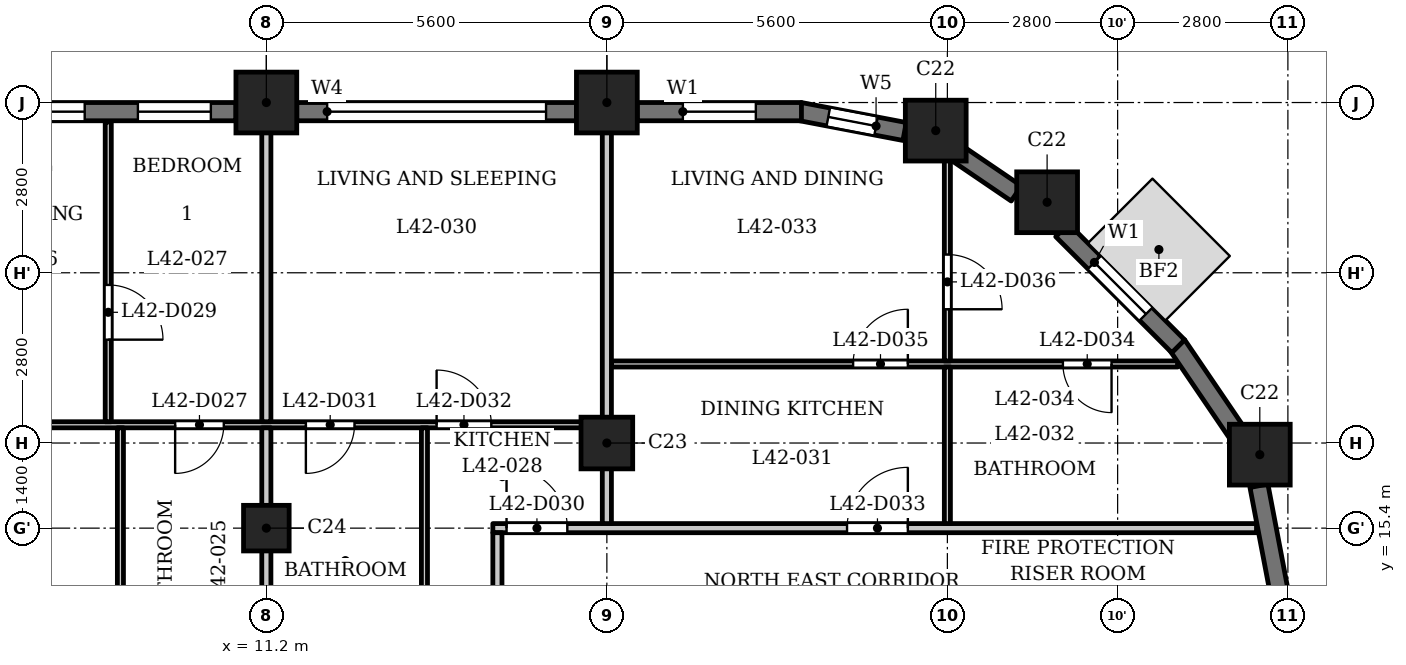
"""IFC4 building model, lengths in metres.
Left out: names, types, materials, properties, quantities, classifications, styles, units other than length and angle.
Written with IfcOpenShell. Run it as: python <this file> out.ifc"""

import sys

from ifc_helpers import new_model, si_unit, direction, frame, frame_2d, origin, origin_2d, place, context, subcontext, project, spatial, rectangle, extrude, element, fill, save


model = new_model("IFC4")
c1 = context("Model", 3, precision=1e-05, world=origin(), true_north=direction((0.0, 1.0)))
c2 = subcontext(c1, "Body", "Model", "MODEL_VIEW")
j1 = project(units=[si_unit("LENGTHUNIT", "METRE"), si_unit("PLANEANGLEUNIT", "RADIAN")], contexts=[c1])
p1 = place(None, origin())
s1 = spatial("IfcSite", under=j1, at=p1, CompositionType="ELEMENT")
p2 = place(p1, origin())
s2 = spatial("IfcBuilding", under=s1, at=p2, CompositionType="ELEMENT")
p3 = place(p2, frame((0.0, 0.0, 164.1)))
s3 = spatial("IfcBuildingStorey", under=s2, at=p3, CompositionType="ELEMENT", Elevation=164.1)
for number, where, z_axis, x_axis in (
    (1, (27.538, 16.609, 0.0), (0.0, 0.0, 1.0), (1.0, 0.0, 0.0)),
    (2, (24.04, 20.76, 0.0), (0.0, 0.0, 1.0), (1.0, 0.0, 0.0)),
    (3, (22.209, 21.938, 0.0), (0.0, 0.0, 1.0), (1.0, 0.0, 0.0)),
    (4, (16.8, 22.4, 0.0), (0.0, 0.0, 1.0), (1.0, 0.0, 0.0)),
    (5, (11.2, 22.4, 0.0), (0.0, 0.0, 1.0), (1.0, 0.0, 0.0)),
):
    element("IfcColumn", number, at=place(p3, frame(where, z_axis=z_axis, x_axis=x_axis)), inside=s3, PredefinedType="COLUMN", context=c2, shape_type="SweptSolid", body=[
        extrude(rectangle(XDim=1.0, YDim=1.0, at=origin_2d()), origin(), (0.0, 0.0, 1.0), 3.5),
    ])
p4 = place(p3, frame((16.8, 16.8, 0.0), z_axis=(0.0, 0.0, 1.0), x_axis=(1.0, 0.0, 0.0)))
e6 = element("IfcColumn", 6, at=p4, inside=s3, PredefinedType="COLUMN", context=c2, shape_type="SweptSolid", body=[
    extrude(rectangle(XDim=0.85, YDim=0.85, at=origin_2d()), origin(), (0.0, 0.0, 1.0), 3.5),
])
p5 = place(p3, frame((11.2, 15.4, 0.0), z_axis=(0.0, 0.0, 1.0), x_axis=(1.0, 0.0, 0.0)))
e7 = element("IfcColumn", 7, at=p5, inside=s3, PredefinedType="COLUMN", context=c2, shape_type="SweptSolid", body=[
    extrude(rectangle(XDim=0.75, YDim=0.75, at=origin_2d()), origin(), (0.0, 0.0, 1.0), 3.5),
])
for number, where, z_axis, x_axis in (
    (8, (27.853, 14.372, 0.0), (0.0, 0.0, 1.0), (-0.187, 0.982, 0.0)),
    (9, (27.166, 16.96, 0.0), (0.0, 0.0, 1.0), (-0.562, 0.827, 0.0)),
):
    element("IfcWall", number, at=place(p3, frame(where, z_axis=z_axis, x_axis=x_axis)), inside=s3, PredefinedType="SOLIDWALL", context=c2, shape_type="SweptSolid", body=[
        extrude(rectangle(XDim=1.756, YDim=0.3, at=frame_2d((0.878, 0.0))), origin(), (0.0, 0.0, 1.0), 2.45),
    ])
p6 = place(p3, frame((26.197, 18.391, 0.0), z_axis=(0.0, 0.0, 1.0), x_axis=(-0.707061571201, 0.707151988282, 0.0)))
e10 = element("IfcWall", 10, at=p6, inside=s3, PredefinedType="SOLIDWALL", context=c2, shape_type="SweptSolid", body=[
    extrude(rectangle(XDim=2.7, YDim=0.3, at=frame_2d((1.35, 0.0))), origin(), (0.0, 0.0, 1.0), 2.45),
])
p7 = place(p6, frame((0.75, 0.0, 0.6)))
e11 = element("IfcOpeningElement", 11, at=p7, cuts=e10, PredefinedType="OPENING", context=c2, shape_type="SweptSolid", body=[
    extrude(rectangle(XDim=1.2, YDim=1.55, at=frame_2d((0.6, 0.775))), frame((0.0, 0.16, 0.0), z_axis=(0.0, -1.0, 0.0), x_axis=(1.0, 0.0, 0.0)), (0.0, 0.0, 1.0), 0.32),
])
p8 = place(p3, frame((23.534, 20.904, 0.0), z_axis=(0.0, 0.0, 1.0), x_axis=(-0.827103906596, 0.56204904385, 0.0)))
e12 = element("IfcWall", 12, at=p8, inside=s3, PredefinedType="SOLIDWALL", context=c2, shape_type="SweptSolid", body=[
    extrude(rectangle(XDim=1.177, YDim=0.3, at=frame_2d((0.589, 0.0))), origin(), (0.0, 0.0, 1.0), 3.2),
])
p9 = place(p3, frame((21.697, 21.924, 0.0), z_axis=(0.0, 0.0, 1.0), x_axis=(-0.982284988433, 0.187393173565, 0.0)))
e13 = element("IfcWall", 13, at=p9, inside=s3, PredefinedType="SOLIDWALL", context=c2, shape_type="SweptSolid", body=[
    extrude(rectangle(XDim=1.756, YDim=0.3, at=frame_2d((0.878, 0.0))), origin(), (0.0, 0.0, 1.0), 2.45),
])
p10 = place(p9, frame((0.478, 0.0, 0.6)))
e14 = element("IfcOpeningElement", 14, at=p10, cuts=e13, PredefinedType="OPENING", context=c2, shape_type="SweptSolid", body=[
    extrude(rectangle(XDim=0.8, YDim=1.55, at=frame_2d((0.4, 0.775))), frame((0.0, 0.16, 0.0), z_axis=(0.0, -1.0, 0.0), x_axis=(1.0, 0.0, 0.0)), (0.0, 0.0, 1.0), 0.32),
])
p11 = place(p3, frame((20.0, 22.25, 0.0), z_axis=(0.0, 0.0, 1.0), x_axis=(-1.0, 0.0, 0.0)))
e15 = element("IfcWall", 15, at=p11, inside=s3, PredefinedType="SOLIDWALL", context=c2, shape_type="SweptSolid", body=[
    extrude(rectangle(XDim=2.7, YDim=0.3, at=frame_2d((1.35, 0.0))), origin(), (0.0, 0.0, 1.0), 2.45),
])
p12 = place(p11, frame((0.75, 0.0, 0.6)))
e16 = element("IfcOpeningElement", 16, at=p12, cuts=e15, PredefinedType="OPENING", context=c2, shape_type="SweptSolid", body=[
    extrude(rectangle(XDim=1.2, YDim=1.55, at=frame_2d((0.6, 0.775))), frame((0.0, 0.16, 0.0), z_axis=(0.0, -1.0, 0.0), x_axis=(1.0, 0.0, 0.0)), (0.0, 0.0, 1.0), 0.32),
])
p13 = place(p3, frame((16.3, 22.25, 0.0), z_axis=(0.0, 0.0, 1.0), x_axis=(-1.0, 0.0, 0.0)))
e17 = element("IfcWall", 17, at=p13, inside=s3, PredefinedType="SOLIDWALL", context=c2, shape_type="SweptSolid", body=[
    extrude(rectangle(XDim=4.6, YDim=0.3, at=frame_2d((2.3, 0.0))), origin(), (0.0, 0.0, 1.0), 2.45),
])
p14 = place(p13, frame((0.5, 0.0, 1.2)))
e18 = element("IfcOpeningElement", 18, at=p14, cuts=e17, PredefinedType="OPENING", context=c2, shape_type="SweptSolid", body=[
    extrude(rectangle(XDim=3.6, YDim=0.95, at=frame_2d((1.8, 0.475))), frame((0.0, 0.16, 0.0), z_axis=(0.0, -1.0, 0.0), x_axis=(1.0, 0.0, 0.0)), (0.0, 0.0, 1.0), 0.32),
])
p15 = place(p3, frame((10.7, 22.25, 0.0), z_axis=(0.0, 0.0, 1.0), x_axis=(-1.0, 0.0, 0.0)))
e19 = element("IfcWall", 19, at=p15, inside=s3, PredefinedType="SOLIDWALL", context=c2, shape_type="SweptSolid", body=[
    extrude(rectangle(XDim=4.6, YDim=0.3, at=frame_2d((2.3, 0.0))), origin(), (0.0, 0.0, 1.0), 2.45),
])
p16 = place(p15, frame((0.413, 0.0, 0.6)))
e20 = element("IfcOpeningElement", 20, at=p16, cuts=e19, PredefinedType="OPENING", context=c2, shape_type="SweptSolid", body=[
    extrude(rectangle(XDim=1.2, YDim=1.55, at=frame_2d((0.6, 0.775))), frame((0.0, 0.16, 0.0), z_axis=(0.0, -1.0, 0.0), x_axis=(1.0, 0.0, 0.0)), (0.0, 0.0, 1.0), 0.32),
])
p17 = place(p15, frame((2.488, 0.0, 0.9)))
e21 = element("IfcOpeningElement", 21, at=p17, cuts=e19, PredefinedType="OPENING", context=c2, shape_type="SweptSolid", body=[
    extrude(rectangle(XDim=1.8, YDim=1.25, at=frame_2d((0.9, 0.625))), frame((0.0, 0.16, 0.0), z_axis=(0.0, -1.0, 0.0), x_axis=(1.0, 0.0, 0.0)), (0.0, 0.0, 1.0), 0.32),
])
p18 = place(p3, frame((14.925, 15.4, 0.0), z_axis=(0.0, 0.0, 1.0), x_axis=(1.0, 0.0, 0.0)))
e22 = element("IfcWall", 22, at=p18, inside=s3, PredefinedType="PARTITIONING", context=c2, shape_type="SweptSolid", body=[
    extrude(rectangle(XDim=12.559, YDim=0.15, at=frame_2d((6.279, 0.0))), origin(), (0.0, 0.0, 1.0), 3.2),
])
p19 = place(p18, frame((0.225, 0.0, 0.0)))
e23 = element("IfcOpeningElement", 23, at=p19, cuts=e22, PredefinedType="OPENING", context=c2, shape_type="SweptSolid", body=[
    extrude(rectangle(XDim=1.0, YDim=2.1, at=frame_2d((0.5, 1.05))), frame((0.0, 0.085, 0.0), z_axis=(0.0, -1.0, 0.0), x_axis=(1.0, 0.0, 0.0)), (0.0, 0.0, 1.0), 0.17),
])
p20 = place(p18, frame((5.825, 0.0, 0.0)))
e24 = element("IfcOpeningElement", 24, at=p20, cuts=e22, PredefinedType="OPENING", context=c2, shape_type="SweptSolid", body=[
    extrude(rectangle(XDim=1.0, YDim=2.1, at=frame_2d((0.5, 1.05))), frame((0.0, 0.085, 0.0), z_axis=(0.0, -1.0, 0.0), x_axis=(1.0, 0.0, 0.0)), (0.0, 0.0, 1.0), 0.17),
])
p21 = place(p3, frame((-16.725, 17.1, 0.0), z_axis=(0.0, 0.0, 1.0), x_axis=(1.0, 0.0, 0.0)))
e25 = element("IfcWall", 25, at=p21, inside=s3, PredefinedType="PARTITIONING", context=c2, shape_type="SweptSolid", body=[
    extrude(rectangle(XDim=33.45, YDim=0.1, at=frame_2d((16.725, 0.0))), origin(), (0.0, 0.0, 1.0), 3.2),
])
p22 = place(p21, frame((11.925, 0.0, 0.0)))
e26 = element("IfcOpeningElement", 26, at=p22, cuts=e25, PredefinedType="OPENING", context=c2, shape_type="SweptSolid", body=[
    extrude(rectangle(XDim=0.9, YDim=2.1, at=frame_2d((0.45, 1.05))), frame((0.0, 0.06, 0.0), z_axis=(0.0, -1.0, 0.0), x_axis=(1.0, 0.0, 0.0)), (0.0, 0.0, 1.0), 0.12),
])
p23 = place(p21, frame((15.175, 0.0, 0.0)))
e27 = element("IfcOpeningElement", 27, at=p23, cuts=e25, PredefinedType="OPENING", context=c2, shape_type="SweptSolid", body=[
    extrude(rectangle(XDim=0.9, YDim=2.1, at=frame_2d((0.45, 1.05))), frame((0.0, 0.06, 0.0), z_axis=(0.0, -1.0, 0.0), x_axis=(1.0, 0.0, 0.0)), (0.0, 0.0, 1.0), 0.12),
])
p24 = place(p21, frame((6.575, 0.0, 0.0)))
e28 = element("IfcOpeningElement", 28, at=p24, cuts=e25, PredefinedType="OPENING", context=c2, shape_type="SweptSolid", body=[
    extrude(rectangle(XDim=0.9, YDim=2.1, at=frame_2d((0.45, 1.05))), frame((0.0, 0.06, 0.0), z_axis=(0.0, -1.0, 0.0), x_axis=(1.0, 0.0, 0.0)), (0.0, 0.0, 1.0), 0.12),
])
p25 = place(p21, frame((17.375, 0.0, 0.0)))
e29 = element("IfcOpeningElement", 29, at=p25, cuts=e25, PredefinedType="OPENING", context=c2, shape_type="SweptSolid", body=[
    extrude(rectangle(XDim=0.8, YDim=2.1, at=frame_2d((0.4, 1.05))), frame((0.0, 0.06, 0.0), z_axis=(0.0, -1.0, 0.0), x_axis=(1.0, 0.0, 0.0)), (0.0, 0.0, 1.0), 0.12),
])
p26 = place(p21, frame((20.025, 0.0, 0.0)))
e30 = element("IfcOpeningElement", 30, at=p26, cuts=e25, PredefinedType="OPENING", context=c2, shape_type="SweptSolid", body=[
    extrude(rectangle(XDim=0.9, YDim=2.1, at=frame_2d((0.45, 1.05))), frame((0.0, 0.06, 0.0), z_axis=(0.0, -1.0, 0.0), x_axis=(1.0, 0.0, 0.0)), (0.0, 0.0, 1.0), 0.12),
])
p27 = place(p21, frame((26.425, 0.0, 0.0)))
e31 = element("IfcOpeningElement", 31, at=p27, cuts=e25, PredefinedType="OPENING", context=c2, shape_type="SweptSolid", body=[
    extrude(rectangle(XDim=0.8, YDim=2.1, at=frame_2d((0.4, 1.05))), frame((0.0, 0.06, 0.0), z_axis=(0.0, -1.0, 0.0), x_axis=(1.0, 0.0, 0.0)), (0.0, 0.0, 1.0), 0.12),
])
p28 = place(p21, frame((23.025, 0.0, 0.0)))
e32 = element("IfcOpeningElement", 32, at=p28, cuts=e25, PredefinedType="OPENING", context=c2, shape_type="SweptSolid", body=[
    extrude(rectangle(XDim=0.9, YDim=2.1, at=frame_2d((0.45, 1.05))), frame((0.0, 0.06, 0.0), z_axis=(0.0, -1.0, 0.0), x_axis=(1.0, 0.0, 0.0)), (0.0, 0.0, 1.0), 0.12),
])
p29 = place(p21, frame((28.575, 0.0, 0.0)))
e33 = element("IfcOpeningElement", 33, at=p29, cuts=e25, PredefinedType="OPENING", context=c2, shape_type="SweptSolid", body=[
    extrude(rectangle(XDim=0.8, YDim=2.1, at=frame_2d((0.4, 1.05))), frame((0.0, 0.06, 0.0), z_axis=(0.0, -1.0, 0.0), x_axis=(1.0, 0.0, 0.0)), (0.0, 0.0, 1.0), 0.12),
])
p30 = place(p21, frame((30.725, 0.0, 0.0)))
e34 = element("IfcOpeningElement", 34, at=p30, cuts=e25, PredefinedType="OPENING", context=c2, shape_type="SweptSolid", body=[
    extrude(rectangle(XDim=0.9, YDim=2.1, at=frame_2d((0.45, 1.05))), frame((0.0, 0.06, 0.0), z_axis=(0.0, -1.0, 0.0), x_axis=(1.0, 0.0, 0.0)), (0.0, 0.0, 1.0), 0.12),
])
p31 = place(p3, frame((16.875, 18.1, 0.0), z_axis=(0.0, 0.0, 1.0), x_axis=(1.0, 0.0, 0.0)))
e35 = element("IfcWall", 35, at=p31, inside=s3, PredefinedType="PARTITIONING", context=c2, shape_type="SweptSolid", body=[
    extrude(rectangle(XDim=9.315, YDim=0.1, at=frame_2d((4.658, 0.0))), origin(), (0.0, 0.0, 1.0), 3.2),
])
p32 = place(p31, frame((7.425, 0.0, 0.0)))
e36 = element("IfcOpeningElement", 36, at=p32, cuts=e35, PredefinedType="OPENING", context=c2, shape_type="SweptSolid", body=[
    extrude(rectangle(XDim=0.8, YDim=2.1, at=frame_2d((0.4, 1.05))), frame((0.0, 0.06, 0.0), z_axis=(0.0, -1.0, 0.0), x_axis=(1.0, 0.0, 0.0)), (0.0, 0.0, 1.0), 0.12),
])
p33 = place(p31, frame((3.975, 0.0, 0.0)))
e37 = element("IfcOpeningElement", 37, at=p33, cuts=e35, PredefinedType="OPENING", context=c2, shape_type="SweptSolid", body=[
    extrude(rectangle(XDim=0.9, YDim=2.1, at=frame_2d((0.45, 1.05))), frame((0.0, 0.06, 0.0), z_axis=(0.0, -1.0, 0.0), x_axis=(1.0, 0.0, 0.0)), (0.0, 0.0, 1.0), 0.12),
])
p34 = place(p3, frame((8.6, 17.15, 0.0), z_axis=(0.0, 0.0, 1.0), x_axis=(0.0, 1.0, 0.0)))
e38 = element("IfcWall", 38, at=p34, inside=s3, PredefinedType="PARTITIONING", context=c2, shape_type="SweptSolid", body=[
    extrude(rectangle(XDim=4.93, YDim=0.1, at=frame_2d((2.465, 0.0))), origin(), (0.0, 0.0, 1.0), 3.2),
])
p35 = place(p34, frame((1.35, 0.0, 0.0)))
e39 = element("IfcOpeningElement", 39, at=p35, cuts=e38, PredefinedType="OPENING", context=c2, shape_type="SweptSolid", body=[
    extrude(rectangle(XDim=0.9, YDim=2.1, at=frame_2d((0.45, 1.05))), frame((0.0, 0.06, 0.0), z_axis=(0.0, -1.0, 0.0), x_axis=(1.0, 0.0, 0.0)), (0.0, 0.0, 1.0), 0.12),
])
p36 = place(p3, frame((8.8, 13.275, 0.0), z_axis=(0.0, 0.0, 1.0), x_axis=(0.0, 1.0, 0.0)))
e40 = element("IfcWall", 40, at=p36, inside=s3, PredefinedType="PARTITIONING", context=c2, shape_type="SweptSolid", body=[
    extrude(rectangle(XDim=3.775, YDim=0.1, at=frame_2d((1.888, 0.0))), origin(), (0.0, 0.0, 1.0), 3.2),
])
p37 = place(p3, frame((11.2, 13.275, 0.0), z_axis=(0.0, 0.0, 1.0), x_axis=(0.0, 1.0, 0.0)))
e41 = element("IfcWall", 41, at=p37, inside=s3, PredefinedType="PARTITIONING", context=c2, shape_type="SweptSolid", body=[
    extrude(rectangle(XDim=3.775, YDim=0.15, at=frame_2d((1.888, 0.0))), origin(), (0.0, 0.0, 1.0), 3.2),
])
p38 = place(p3, frame((11.2, 17.15, 0.0), z_axis=(0.0, 0.0, 1.0), x_axis=(0.0, 1.0, 0.0)))
e42 = element("IfcWall", 42, at=p38, inside=s3, PredefinedType="PARTITIONING", context=c2, shape_type="SweptSolid", body=[
    extrude(rectangle(XDim=5.73, YDim=0.15, at=frame_2d((2.865, 0.0))), origin(), (0.0, 0.0, 1.0), 3.2),
])
p39 = place(p3, frame((13.8, 13.275, 0.0), z_axis=(0.0, 0.0, 1.0), x_axis=(0.0, 1.0, 0.0)))
e43 = element("IfcWall", 43, at=p39, inside=s3, PredefinedType="PARTITIONING", context=c2, shape_type="SweptSolid", body=[
    extrude(rectangle(XDim=3.775, YDim=0.1, at=frame_2d((1.888, 0.0))), origin(), (0.0, 0.0, 1.0), 3.2),
])
p40 = place(p3, frame((15.0, 13.275, 0.0), z_axis=(0.0, 0.0, 1.0), x_axis=(0.0, 1.0, 0.0)))
e44 = element("IfcWall", 44, at=p40, inside=s3, PredefinedType="PARTITIONING", context=c2, shape_type="SweptSolid", body=[
    extrude(rectangle(XDim=2.05, YDim=0.15, at=frame_2d((1.025, 0.0))), origin(), (0.0, 0.0, 1.0), 3.2),
])
p41 = place(p3, frame((16.8, 15.475, 0.0), z_axis=(0.0, 0.0, 1.0), x_axis=(0.0, 1.0, 0.0)))
e45 = element("IfcWall", 45, at=p41, inside=s3, PredefinedType="PARTITIONING", context=c2, shape_type="SweptSolid", body=[
    extrude(rectangle(XDim=7.405, YDim=0.15, at=frame_2d((3.702, 0.0))), origin(), (0.0, 0.0, 1.0), 3.2),
])
p42 = place(p3, frame((22.4, 15.475, 0.0), z_axis=(0.0, 0.0, 1.0), x_axis=(0.0, 1.0, 0.0)))
e46 = element("IfcWall", 46, at=p42, inside=s3, PredefinedType="PARTITIONING", context=c2, shape_type="SweptSolid", body=[
    extrude(rectangle(XDim=2.575, YDim=0.1, at=frame_2d((1.288, 0.0))), origin(), (0.0, 0.0, 1.0), 3.2),
])
p43 = place(p3, frame((22.4, 18.15, 0.0), z_axis=(0.0, 0.0, 1.0), x_axis=(0.0, 1.0, 0.0)))
e47 = element("IfcWall", 47, at=p43, inside=s3, PredefinedType="PARTITIONING", context=c2, shape_type="SweptSolid", body=[
    extrude(rectangle(XDim=3.57, YDim=0.1, at=frame_2d((1.785, 0.0))), origin(), (0.0, 0.0, 1.0), 3.2),
])
p44 = place(p43, frame((0.85, 0.0, 0.0)))
e48 = element("IfcOpeningElement", 48, at=p44, cuts=e47, PredefinedType="OPENING", context=c2, shape_type="SweptSolid", body=[
    extrude(rectangle(XDim=0.9, YDim=2.1, at=frame_2d((0.45, 1.05))), frame((0.0, 0.06, 0.0), z_axis=(0.0, -1.0, 0.0), x_axis=(1.0, 0.0, 0.0)), (0.0, 0.0, 1.0), 0.12),
])
p45 = place(p27, origin())
e49 = element("IfcDoor", 49, at=p45, inside=s3, OperationType="SINGLE_SWING_LEFT", PredefinedType="DOOR", context=c2, shape_type="SweptSolid", body=[
    extrude(rectangle(XDim=0.8, YDim=2.1, at=frame_2d((0.4, 1.05))), frame((0.0, 0.025, 0.0), z_axis=(0.0, -1.0, 0.0), x_axis=(1.0, 0.0, 0.0)), (0.0, 0.0, 1.0), 0.05),
])
fill(e31, e49)
p46 = place(p35, origin())
e50 = element("IfcDoor", 50, at=p46, inside=s3, OperationType="SINGLE_SWING_LEFT", PredefinedType="DOOR", context=c2, shape_type="SweptSolid", body=[
    extrude(rectangle(XDim=0.9, YDim=2.1, at=frame_2d((0.45, 1.05))), frame((0.0, 0.025, 0.0), z_axis=(0.0, -1.0, 0.0), x_axis=(1.0, 0.0, 0.0)), (0.0, 0.0, 1.0), 0.05),
])
fill(e39, e50)
p47 = place(p19, origin())
e51 = element("IfcDoor", 51, at=p47, inside=s3, OperationType="SINGLE_SWING_RIGHT", PredefinedType="DOOR", context=c2, shape_type="SweptSolid", body=[
    extrude(rectangle(XDim=1.0, YDim=2.1, at=frame_2d((0.5, 1.05))), frame((0.0, 0.025, 0.0), z_axis=(0.0, -1.0, 0.0), x_axis=(1.0, 0.0, 0.0)), (0.0, 0.0, 1.0), 0.05),
])
fill(e23, e51)
p48 = place(p29, origin())
e52 = element("IfcDoor", 52, at=p48, inside=s3, OperationType="SINGLE_SWING_LEFT", PredefinedType="DOOR", context=c2, shape_type="SweptSolid", body=[
    extrude(rectangle(XDim=0.8, YDim=2.1, at=frame_2d((0.4, 1.05))), frame((0.0, 0.025, 0.0), z_axis=(0.0, -1.0, 0.0), x_axis=(1.0, 0.0, 0.0)), (0.0, 0.0, 1.0), 0.05),
])
fill(e33, e52)
p49 = place(p30, origin())
e53 = element("IfcDoor", 53, at=p49, inside=s3, OperationType="SINGLE_SWING_RIGHT", PredefinedType="DOOR", context=c2, shape_type="SweptSolid", body=[
    extrude(rectangle(XDim=0.9, YDim=2.1, at=frame_2d((0.45, 1.05))), frame((0.0, 0.025, 0.0), z_axis=(0.0, -1.0, 0.0), x_axis=(1.0, 0.0, 0.0)), (0.0, 0.0, 1.0), 0.05),
])
fill(e34, e53)
p50 = place(p20, origin())
e54 = element("IfcDoor", 54, at=p50, inside=s3, OperationType="SINGLE_SWING_LEFT", PredefinedType="DOOR", context=c2, shape_type="SweptSolid", body=[
    extrude(rectangle(XDim=1.0, YDim=2.1, at=frame_2d((0.5, 1.05))), frame((0.0, 0.025, 0.0), z_axis=(0.0, -1.0, 0.0), x_axis=(1.0, 0.0, 0.0)), (0.0, 0.0, 1.0), 0.05),
])
fill(e24, e54)
p51 = place(p32, origin())
e55 = element("IfcDoor", 55, at=p51, inside=s3, OperationType="SINGLE_SWING_RIGHT", PredefinedType="DOOR", context=c2, shape_type="SweptSolid", body=[
    extrude(rectangle(XDim=0.8, YDim=2.1, at=frame_2d((0.4, 1.05))), frame((0.0, 0.025, 0.0), z_axis=(0.0, -1.0, 0.0), x_axis=(1.0, 0.0, 0.0)), (0.0, 0.0, 1.0), 0.05),
])
fill(e36, e55)
p52 = place(p33, origin())
e56 = element("IfcDoor", 56, at=p52, inside=s3, OperationType="SINGLE_SWING_LEFT", PredefinedType="DOOR", context=c2, shape_type="SweptSolid", body=[
    extrude(rectangle(XDim=0.9, YDim=2.1, at=frame_2d((0.45, 1.05))), frame((0.0, 0.025, 0.0), z_axis=(0.0, -1.0, 0.0), x_axis=(1.0, 0.0, 0.0)), (0.0, 0.0, 1.0), 0.05),
])
fill(e37, e56)
p53 = place(p44, origin())
e57 = element("IfcDoor", 57, at=p53, inside=s3, OperationType="SINGLE_SWING_LEFT", PredefinedType="DOOR", context=c2, shape_type="SweptSolid", body=[
    extrude(rectangle(XDim=0.9, YDim=2.1, at=frame_2d((0.45, 1.05))), frame((0.0, 0.025, 0.0), z_axis=(0.0, -1.0, 0.0), x_axis=(1.0, 0.0, 0.0)), (0.0, 0.0, 1.0), 0.05),
])
fill(e48, e57)
p54 = place(p7, origin())
e58 = element("IfcWindow", 58, at=p54, inside=s3, PartitioningType="SINGLE_PANEL", PredefinedType="WINDOW", context=c2, shape_type="SweptSolid", body=[
    extrude(rectangle(XDim=1.2, YDim=1.55, at=frame_2d((0.6, 0.775))), frame((0.0, 0.03, 0.0), z_axis=(0.0, -1.0, 0.0), x_axis=(1.0, 0.0, 0.0)), (0.0, 0.0, 1.0), 0.06),
])
fill(e11, e58)
p55 = place(p10, origin())
e59 = element("IfcWindow", 59, at=p55, inside=s3, PartitioningType="SINGLE_PANEL", PredefinedType="WINDOW", context=c2, shape_type="SweptSolid", body=[
    extrude(rectangle(XDim=0.8, YDim=1.55, at=frame_2d((0.4, 0.775))), frame((0.0, 0.03, 0.0), z_axis=(0.0, -1.0, 0.0), x_axis=(1.0, 0.0, 0.0)), (0.0, 0.0, 1.0), 0.06),
])
fill(e14, e59)
p56 = place(p12, origin())
e60 = element("IfcWindow", 60, at=p56, inside=s3, PartitioningType="SINGLE_PANEL", PredefinedType="WINDOW", context=c2, shape_type="SweptSolid", body=[
    extrude(rectangle(XDim=1.2, YDim=1.55, at=frame_2d((0.6, 0.775))), frame((0.0, 0.03, 0.0), z_axis=(0.0, -1.0, 0.0), x_axis=(1.0, 0.0, 0.0)), (0.0, 0.0, 1.0), 0.06),
])
fill(e16, e60)
p57 = place(p14, origin())
e61 = element("IfcWindow", 61, at=p57, inside=s3, PartitioningType="SINGLE_PANEL", PredefinedType="WINDOW", context=c2, shape_type="SweptSolid", body=[
    extrude(rectangle(XDim=3.6, YDim=0.95, at=frame_2d((1.8, 0.475))), frame((0.0, 0.03, 0.0), z_axis=(0.0, -1.0, 0.0), x_axis=(1.0, 0.0, 0.0)), (0.0, 0.0, 1.0), 0.06),
])
fill(e18, e61)
p58 = place(p16, origin())
e62 = element("IfcWindow", 62, at=p58, inside=s3, PartitioningType="SINGLE_PANEL", PredefinedType="WINDOW", context=c2, shape_type="SweptSolid", body=[
    extrude(rectangle(XDim=1.2, YDim=1.55, at=frame_2d((0.6, 0.775))), frame((0.0, 0.03, 0.0), z_axis=(0.0, -1.0, 0.0), x_axis=(1.0, 0.0, 0.0)), (0.0, 0.0, 1.0), 0.06),
])
fill(e20, e62)
p59 = place(p17, origin())
e63 = element("IfcWindow", 63, at=p59, inside=s3, PartitioningType="SINGLE_PANEL", PredefinedType="WINDOW", context=c2, shape_type="SweptSolid", body=[
    extrude(rectangle(XDim=1.8, YDim=1.25, at=frame_2d((0.9, 0.625))), frame((0.0, 0.03, 0.0), z_axis=(0.0, -1.0, 0.0), x_axis=(1.0, 0.0, 0.0)), (0.0, 0.0, 1.0), 0.06),
])
fill(e21, e63)
save(model, sys.argv[1])
